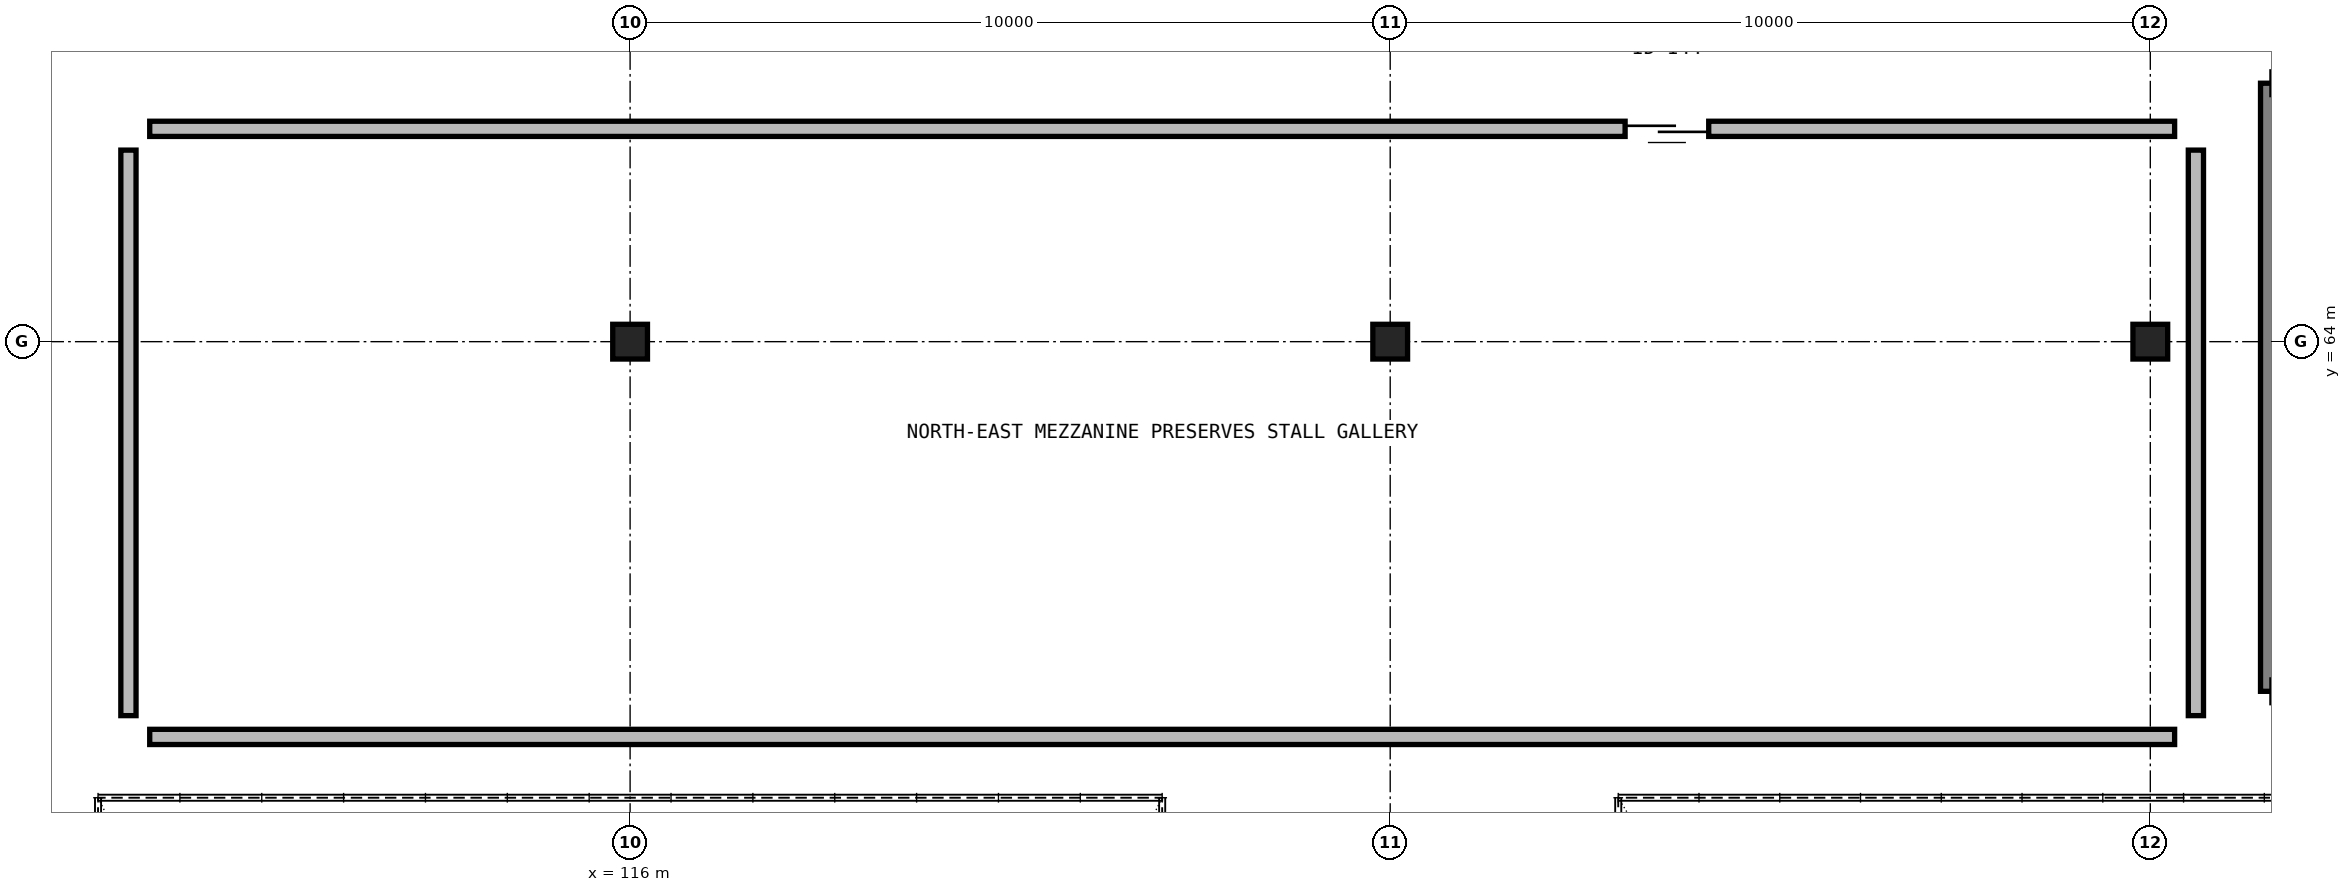
"""IFC4 building model, lengths in metres.
Left out: names, types, materials, properties, quantities, classifications, styles, units other than length and angle.
Written with IfcOpenShell. Run it as: python <this file> out.ifc"""

import sys

from ifc_helpers import new_model, si_unit, direction, frame, frame_2d, origin, origin_2d_with_axis, place, context, subcontext, project, spatial, rectangle, hollow_circle, extrude, element, fill, save


model = new_model("IFC4")
c1 = context("Model", 3, precision=1e-05, world=origin(), true_north=direction((0.0, 1.0)))
c2 = subcontext(c1, "Body", "Model", "MODEL_VIEW")
j1 = project(units=[si_unit("LENGTHUNIT", "METRE"), si_unit("PLANEANGLEUNIT", "RADIAN")], contexts=[c1])
p1 = place(None, origin())
s1 = spatial("IfcSite", under=j1, at=p1, CompositionType="ELEMENT")
p2 = place(p1, origin())
s2 = spatial("IfcBuilding", under=s1, at=p2, CompositionType="ELEMENT")
p3 = place(p2, frame((0.0, 0.0, 4.5)))
s3 = spatial("IfcBuildingStorey", under=s2, at=p3, CompositionType="ELEMENT", Elevation=4.5)
for number, where, z_axis, x_axis in (
    (1, (116.0, 64.0, 0.0), (0.0, 0.0, 1.0), (1.0, 0.0, 0.0)),
    (2, (126.0, 64.0, 0.0), (0.0, 0.0, 1.0), (1.0, 0.0, 0.0)),
    (3, (136.0, 64.0, 0.0), (0.0, 0.0, 1.0), (1.0, 0.0, 0.0)),
):
    element("IfcColumn", number, at=place(p3, frame(where, z_axis=z_axis, x_axis=x_axis)), inside=s3, PredefinedType="COLUMN", context=c2, shape_type="SweptSolid", body=[
        extrude(hollow_circle(Radius=0.229, WallThickness=0.013, at=origin_2d_with_axis()), origin(), (0.0, 0.0, 1.0), 3.9),
    ])
p4 = place(p3, frame((137.6, 67.4, 0.0), z_axis=(0.0, 0.0, 1.0), x_axis=(0.0, -1.0, 0.0)))
e4 = element("IfcWall", 4, at=p4, inside=s3, PredefinedType="SHEAR", context=c2, shape_type="SweptSolid", body=[
    extrude(rectangle(XDim=8.0, YDim=0.3, at=frame_2d((4.0, 0.0), x_axis=(1.0, 0.0))), origin(), (0.0, 0.0, 1.0), 3.9),
])
p5 = place(p3, frame((109.68, 58.8, 0.0), z_axis=(0.0, 0.0, 1.0), x_axis=(1.0, 0.0, 0.0)))
e5 = element("IfcWall", 5, at=p5, inside=s3, PredefinedType="MOVABLE", context=c2, shape_type="SweptSolid", body=[
    extrude(rectangle(XDim=26.64, YDim=0.2, at=frame_2d((13.32, 0.0), x_axis=(1.0, 0.0))), origin(), (0.0, 0.0, 1.0), 3.03),
])
p6 = place(p3, frame((136.6, 59.08, 0.0), z_axis=(0.0, 0.0, 1.0), x_axis=(0.0, 1.0, 0.0)))
e6 = element("IfcWall", 6, at=p6, inside=s3, PredefinedType="MOVABLE", context=c2, shape_type="SweptSolid", body=[
    extrude(rectangle(XDim=7.44, YDim=0.2, at=frame_2d((3.72, 0.0), x_axis=(1.0, 0.0))), origin(), (0.0, 0.0, 1.0), 3.03),
])
p7 = place(p3, frame((136.32, 66.8, 0.0), z_axis=(0.0, 0.0, 1.0), x_axis=(-1.0, 0.0, 0.0)))
e7 = element("IfcWall", 7, at=p7, inside=s3, PredefinedType="MOVABLE", context=c2, shape_type="SweptSolid", body=[
    extrude(rectangle(XDim=26.64, YDim=0.2, at=frame_2d((13.32, 0.0), x_axis=(1.0, 0.0))), origin(), (0.0, 0.0, 1.0), 3.03),
])
p8 = place(p7, frame((6.13, 0.0, 0.0)))
e8 = element("IfcOpeningElement", 8, at=p8, cuts=e7, PredefinedType="OPENING", context=c2, shape_type="SweptSolid", body=[
    extrude(rectangle(XDim=1.1, YDim=2.15, at=frame_2d((0.55, 1.075), x_axis=(1.0, 0.0))), frame((0.0, 0.11, 0.0), z_axis=(0.0, -1.0, 0.0), x_axis=(1.0, 0.0, 0.0)), (0.0, 0.0, 1.0), 0.22),
])
p9 = place(p3, frame((109.4, 66.52, 0.0), z_axis=(0.0, 0.0, 1.0), x_axis=(0.0, -1.0, 0.0)))
e9 = element("IfcWall", 9, at=p9, inside=s3, PredefinedType="MOVABLE", context=c2, shape_type="SweptSolid", body=[
    extrude(rectangle(XDim=7.44, YDim=0.2, at=frame_2d((3.72, 0.0), x_axis=(1.0, 0.0))), origin(), (0.0, 0.0, 1.0), 3.03),
])
p10 = place(p8, origin())
e10 = element("IfcDoor", 10, at=p10, inside=s3, OperationType="SLIDING_TO_LEFT", PredefinedType="DOOR", context=c2, shape_type="SweptSolid", body=[
    extrude(rectangle(XDim=1.1, YDim=2.15, at=frame_2d((0.55, 1.075), x_axis=(1.0, 0.0))), frame((0.0, 0.025, 0.0), z_axis=(0.0, -1.0, 0.0), x_axis=(1.0, 0.0, 0.0)), (0.0, 0.0, 1.0), 0.05),
])
fill(e8, e10)
save(model, sys.argv[1])
